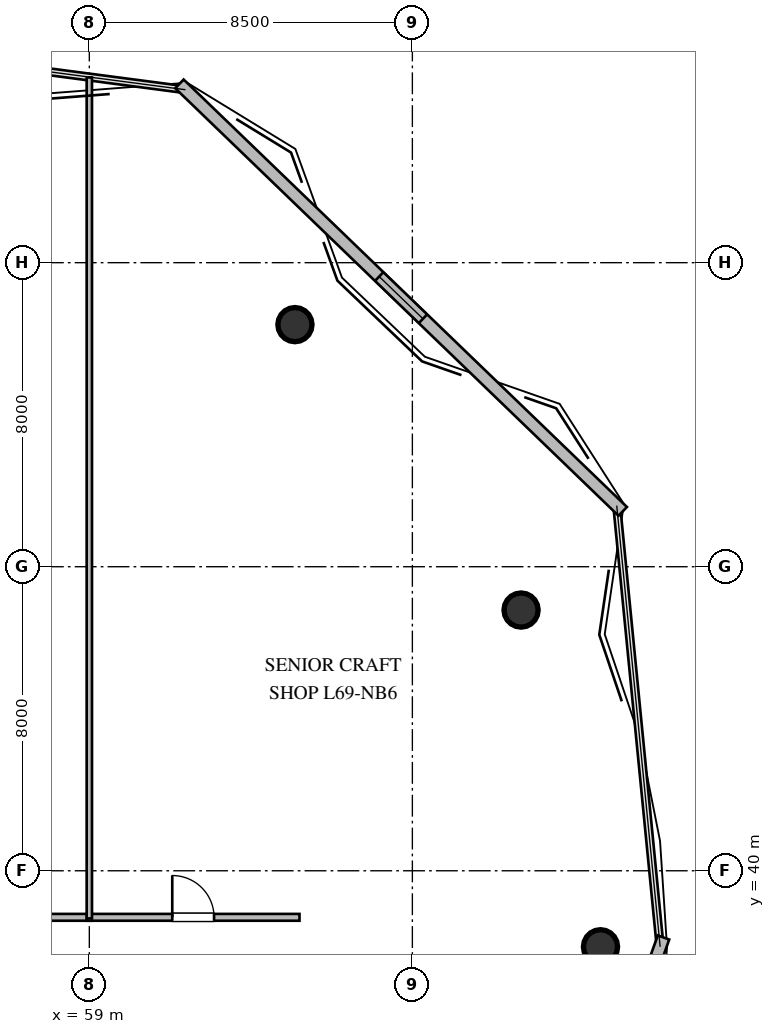
"""IFC4 building model, lengths in metres.
Left out: names, types, materials, properties, quantities, classifications, styles, units other than length and angle.
Written with IfcOpenShell. Run it as: python <this file> out.ifc"""

import sys

from ifc_helpers import new_model, si_unit, direction, frame, frame_2d, origin, origin_2d, place, context, subcontext, project, spatial, rectangle, circle, extrude, element, fill, save


model = new_model("IFC4")
c1 = context("Model", 3, precision=1e-05, world=origin(), true_north=direction((0.0, 1.0)))
c2 = subcontext(c1, "Body", "Model", "MODEL_VIEW")
j1 = project(units=[si_unit("LENGTHUNIT", "METRE"), si_unit("PLANEANGLEUNIT", "RADIAN")], contexts=[c1])
p1 = place(None, origin())
s1 = spatial("IfcSite", under=j1, at=p1, CompositionType="ELEMENT")
p2 = place(p1, origin())
s2 = spatial("IfcBuilding", under=s1, at=p2, CompositionType="ELEMENT")
p3 = place(p2, frame((0.0, 0.0, 262.4)))
s3 = spatial("IfcBuildingStorey", under=s2, at=p3, CompositionType="ELEMENT", Elevation=262.4)
for number, where, z_axis, x_axis in (
    (1, (72.45, 38.0, 0.0), (0.0, 0.0, 1.0), (1.0, 0.0, 0.0)),
    (2, (70.36, 46.86, 0.0), (0.0, 0.0, 1.0), (1.0, 0.0, 0.0)),
    (3, (64.41, 54.37, 0.0), (0.0, 0.0, 1.0), (1.0, 0.0, 0.0)),
):
    element("IfcColumn", number, at=place(p3, frame(where, z_axis=z_axis, x_axis=x_axis)), inside=s3, PredefinedType="COLUMN", context=c2, shape_type="SweptSolid", body=[
        extrude(circle(Radius=0.45, at=origin_2d()), origin(), (0.0, 0.0, 1.0), 3.8),
    ])
p4 = place(p3, frame((74.108, 38.245, 0.0), z_axis=(0.0, 0.0, 1.0), x_axis=(-0.337073777429, -0.941478235845, 0.0)))
e4 = element("IfcWall", 4, at=p4, inside=s3, PredefinedType="STANDARD", context=c2, shape_type="SweptSolid", body=[
    extrude(rectangle(XDim=13.673, YDim=0.32, at=frame_2d((6.837, 0.0))), origin(), (0.0, 0.0, 1.0), 3.56),
])
p5 = place(p3, frame((61.371, 60.704, 0.0), z_axis=(0.0, 0.0, 1.0), x_axis=(0.719819827488, -0.694160943842, 0.0)))
e5 = element("IfcWall", 5, at=p5, inside=s3, PredefinedType="STANDARD", context=c2, shape_type="SweptSolid", body=[
    extrude(rectangle(XDim=16.204, YDim=0.32, at=frame_2d((8.102, 0.0))), origin(), (0.0, 0.0, 1.0), 3.56),
])
p6 = place(p5, frame((7.302, 0.0, 1.05)))
e6 = element("IfcOpeningElement", 6, at=p6, cuts=e5, PredefinedType="OPENING", context=c2, shape_type="SweptSolid", body=[
    extrude(rectangle(XDim=1.6, YDim=1.5, at=frame_2d((0.8, 0.75))), frame((0.0, 0.17, 0.0), z_axis=(0.0, -1.0, 0.0), x_axis=(1.0, 0.0, 0.0)), (0.0, 0.0, 1.0), 0.34),
])
p7 = place(p3, frame((54.185, 38.775, 0.0), z_axis=(0.0, 0.0, 1.0), x_axis=(1.0, 0.0, 0.0)))
e7 = element("IfcWall", 7, at=p7, inside=s3, PredefinedType="PARTITIONING", context=c2, shape_type="SweptSolid", body=[
    extrude(rectangle(XDim=4.88, YDim=0.18, at=frame_2d((2.44, 0.0))), origin(), (0.0, 0.0, 1.0), 3.56),
])
p8 = place(p7, frame((1.89, 0.0, 0.0)))
e8 = element("IfcOpeningElement", 8, at=p8, cuts=e7, PredefinedType="OPENING", context=c2, shape_type="SweptSolid", body=[
    extrude(rectangle(XDim=1.1, YDim=2.1, at=frame_2d((0.55, 1.05))), frame((0.0, 0.1, 0.0), z_axis=(0.0, -1.0, 0.0), x_axis=(1.0, 0.0, 0.0)), (0.0, 0.0, 1.0), 0.2),
])
p9 = place(p3, frame((58.935, 38.775, 0.0), z_axis=(0.0, 0.0, 1.0), x_axis=(1.0, 0.0, 0.0)))
e9 = element("IfcWall", 9, at=p9, inside=s3, PredefinedType="PARTITIONING", context=c2, shape_type="SweptSolid", body=[
    extrude(rectangle(XDim=5.595, YDim=0.18, at=frame_2d((2.797, 0.0))), origin(), (0.0, 0.0, 1.0), 3.56),
])
p10 = place(p9, frame((2.247, 0.0, 0.0)))
e10 = element("IfcOpeningElement", 10, at=p10, cuts=e9, PredefinedType="OPENING", context=c2, shape_type="SweptSolid", body=[
    extrude(rectangle(XDim=1.1, YDim=2.1, at=frame_2d((0.55, 1.05))), frame((0.0, 0.1, 0.0), z_axis=(0.0, -1.0, 0.0), x_axis=(1.0, 0.0, 0.0)), (0.0, 0.0, 1.0), 0.2),
])
p11 = place(p3, frame((59.0, 60.874, 0.0), z_axis=(0.0, 0.0, 1.0), x_axis=(0.0, -1.0, 0.0)))
e11 = element("IfcWall", 11, at=p11, inside=s3, PredefinedType="PARTITIONING", context=c2, shape_type="SweptSolid", body=[
    extrude(rectangle(XDim=22.129, YDim=0.14, at=frame_2d((11.064, 0.0))), origin(), (0.0, 0.0, 1.0), 3.56),
])
p12 = place(p6, origin())
e12 = element("IfcWindow", 12, at=p12, inside=s3, PartitioningType="SINGLE_PANEL", PredefinedType="WINDOW", context=c2, shape_type="SweptSolid", body=[
    extrude(rectangle(XDim=1.6, YDim=1.5, at=frame_2d((0.8, 0.75))), frame((0.0, 0.03, 0.0), z_axis=(0.0, -1.0, 0.0), x_axis=(1.0, 0.0, 0.0)), (0.0, 0.0, 1.0), 0.06),
])
fill(e6, e12)
p13 = place(p10, origin())
e13 = element("IfcDoor", 13, at=p13, inside=s3, OperationType="SINGLE_SWING_LEFT", PredefinedType="DOOR", context=c2, shape_type="SweptSolid", body=[
    extrude(rectangle(XDim=1.1, YDim=2.1, at=frame_2d((0.55, 1.05))), frame((0.0, 0.025, 0.0), z_axis=(0.0, -1.0, 0.0), x_axis=(1.0, 0.0, 0.0)), (0.0, 0.0, 1.0), 0.05),
])
fill(e10, e13)
save(model, sys.argv[1])
